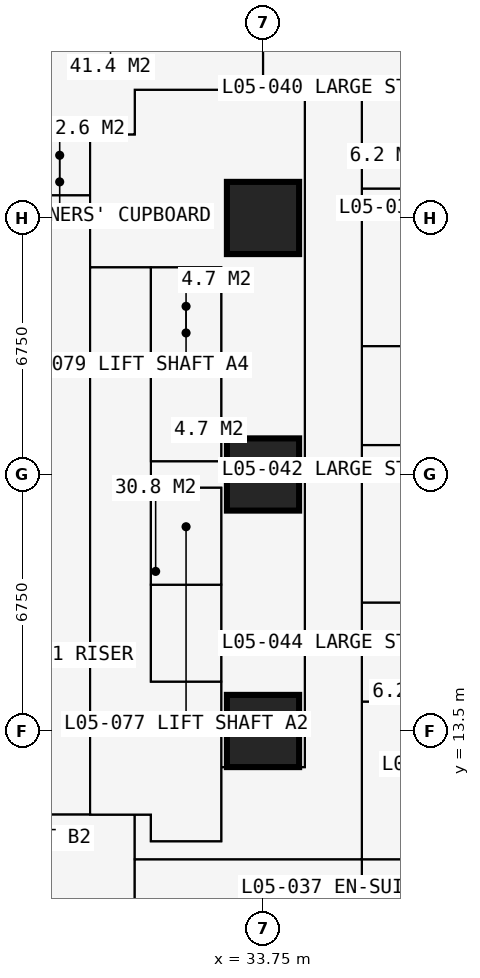
"""IFC4 building model, lengths in metres.
Left out: names, types, materials, properties, quantities, classifications, styles, units other than length and angle.
Written with IfcOpenShell. Run it as: python <this file> out.ifc"""

import sys

from ifc_helpers import new_model, si_unit, direction, frame, frame_2d, origin, origin_2d, place, context, subcontext, project, spatial, rectangle, extrude, element, fill, save


model = new_model("IFC4")
c1 = context("Model", 3, precision=1e-05, world=origin(), true_north=direction((0.0, 1.0)))
c2 = subcontext(c1, "Body", "Model", "MODEL_VIEW")
j1 = project(units=[si_unit("LENGTHUNIT", "METRE"), si_unit("PLANEANGLEUNIT", "RADIAN")], contexts=[c1])
p1 = place(None, origin())
s1 = spatial("IfcSite", under=j1, at=p1, CompositionType="ELEMENT")
p2 = place(p1, origin())
s2 = spatial("IfcBuilding", under=s1, at=p2, CompositionType="ELEMENT")
p3 = place(p2, frame((0.0, 0.0, 21.6)))
s3 = spatial("IfcBuildingStorey", under=s2, at=p3, CompositionType="ELEMENT", Elevation=21.6)
for number, where, z_axis, x_axis in (
    (1, (33.75, 13.5, 0.0), (0.0, 0.0, 1.0), (1.0, 0.0, 0.0)),
    (2, (33.75, 20.25, 0.0), (0.0, 0.0, 1.0), (1.0, 0.0, 0.0)),
    (3, (33.75, 27.0, 0.0), (0.0, 0.0, 1.0), (1.0, 0.0, 0.0)),
):
    element("IfcColumn", number, at=place(p3, frame(where, z_axis=z_axis, x_axis=x_axis)), inside=s3, PredefinedType="COLUMN", context=c2, shape_type="SweptSolid", body=[
        extrude(rectangle(XDim=1.9, YDim=1.9, at=origin_2d()), origin(), (0.0, 0.0, 1.0), 3.6),
    ])
p4 = place(p3, frame((10.125, 11.3, 0.0), z_axis=(0.0, 0.0, 1.0), x_axis=(1.0, 0.0, 0.0)))
e4 = element("IfcWall", 4, at=p4, inside=s3, PredefinedType="PARTITIONING", context=c2, shape_type="SweptSolid", body=[
    extrude(rectangle(XDim=20.675, YDim=0.15, at=frame_2d((10.337, 0.0))), origin(), (0.0, 0.0, 1.0), 3.375),
])
p5 = place(p4, frame((8.375, 0.0, 0.0)))
e5 = element("IfcOpeningElement", 5, at=p5, cuts=e4, PredefinedType="OPENING", context=c2, shape_type="SweptSolid", body=[
    extrude(rectangle(XDim=1.0, YDim=2.2, at=frame_2d((0.5, 1.1))), frame((0.0, 0.085, 0.0), z_axis=(0.0, -1.0, 0.0), x_axis=(1.0, 0.0, 0.0)), (0.0, 0.0, 1.0), 0.17),
])
p6 = place(p4, frame((10.975, 0.0, 0.0)))
e6 = element("IfcOpeningElement", 6, at=p6, cuts=e4, PredefinedType="OPENING", context=c2, shape_type="SweptSolid", body=[
    extrude(rectangle(XDim=1.0, YDim=2.2, at=frame_2d((0.5, 1.1))), frame((0.0, 0.085, 0.0), z_axis=(0.0, -1.0, 0.0), x_axis=(1.0, 0.0, 0.0)), (0.0, 0.0, 1.0), 0.17),
])
p7 = place(p4, frame((3.925, 0.0, 0.0)))
e7 = element("IfcOpeningElement", 7, at=p7, cuts=e4, PredefinedType="OPENING", context=c2, shape_type="SweptSolid", body=[
    extrude(rectangle(XDim=0.95, YDim=2.2, at=frame_2d((0.475, 1.1))), frame((0.0, 0.085, 0.0), z_axis=(0.0, -1.0, 0.0), x_axis=(1.0, 0.0, 0.0)), (0.0, 0.0, 1.0), 0.17),
])
p8 = place(p3, frame((11.3, 29.2, 0.0), z_axis=(0.0, 0.0, 1.0), x_axis=(1.0, 0.0, 0.0)))
e8 = element("IfcWall", 8, at=p8, inside=s3, PredefinedType="PARTITIONING", context=c2, shape_type="SweptSolid", body=[
    extrude(rectangle(XDim=19.075, YDim=0.15, at=frame_2d((9.538, 0.0))), origin(), (0.0, 0.0, 1.0), 3.375),
])
p9 = place(p8, frame((12.875, 0.0, 0.0)))
e9 = element("IfcOpeningElement", 9, at=p9, cuts=e8, PredefinedType="OPENING", context=c2, shape_type="SweptSolid", body=[
    extrude(rectangle(XDim=1.0, YDim=2.2, at=frame_2d((0.5, 1.1))), frame((0.0, 0.085, 0.0), z_axis=(0.0, -1.0, 0.0), x_axis=(1.0, 0.0, 0.0)), (0.0, 0.0, 1.0), 0.17),
])
p10 = place(p8, frame((10.438, 0.0, 0.0)))
e10 = element("IfcOpeningElement", 10, at=p10, cuts=e8, PredefinedType="OPENING", context=c2, shape_type="SweptSolid", body=[
    extrude(rectangle(XDim=1.0, YDim=2.2, at=frame_2d((0.5, 1.1))), frame((0.0, 0.085, 0.0), z_axis=(0.0, -1.0, 0.0), x_axis=(1.0, 0.0, 0.0)), (0.0, 0.0, 1.0), 0.17),
])
p11 = place(p8, frame((14.875, 0.0, 0.0)))
e11 = element("IfcOpeningElement", 11, at=p11, cuts=e8, PredefinedType="OPENING", context=c2, shape_type="SweptSolid", body=[
    extrude(rectangle(XDim=0.95, YDim=2.2, at=frame_2d((0.475, 1.1))), frame((0.0, 0.085, 0.0), z_axis=(0.0, -1.0, 0.0), x_axis=(1.0, 0.0, 0.0)), (0.0, 0.0, 1.0), 0.17),
])
p12 = place(p3, frame((27.6, 27.6, 0.0), z_axis=(0.0, 0.0, 1.0), x_axis=(1.0, 0.0, 0.0)))
e12 = element("IfcWall", 12, at=p12, inside=s3, PredefinedType="PARTITIONING", context=c2, shape_type="SweptSolid", body=[
    extrude(rectangle(XDim=1.6, YDim=0.15, at=frame_2d((0.8, 0.0))), origin(), (0.0, 0.0, 1.0), 2.877),
])
p13 = place(p3, frame((29.2, 11.3, 0.0), z_axis=(0.0, 0.0, 1.0), x_axis=(0.0, 1.0, 0.0)))
e13 = element("IfcWall", 13, at=p13, inside=s3, PredefinedType="PARTITIONING", context=c2, shape_type="SweptSolid", body=[
    extrude(rectangle(XDim=17.9, YDim=0.2, at=frame_2d((8.95, 0.0))), origin(), (0.0, 0.0, 1.0), 3.375),
])
p14 = place(p13, frame((8.35, 0.0, 0.0)))
e14 = element("IfcOpeningElement", 14, at=p14, cuts=e13, PredefinedType="OPENING", context=c2, shape_type="SweptSolid", body=[
    extrude(rectangle(XDim=1.2, YDim=2.2, at=frame_2d((0.6, 1.1))), frame((0.0, 0.11, 0.0), z_axis=(0.0, -1.0, 0.0), x_axis=(1.0, 0.0, 0.0)), (0.0, 0.0, 1.0), 0.22),
])
p15 = place(p3, frame((29.2, 25.7, 0.0), z_axis=(0.0, 0.0, 1.0), x_axis=(1.0, 0.0, 0.0)))
e15 = element("IfcWall", 15, at=p15, inside=s3, PredefinedType="SHEAR", context=c2, shape_type="SweptSolid", body=[
    extrude(rectangle(XDim=3.45, YDim=0.1, at=frame_2d((1.725, 0.0))), origin(), (0.0, 0.0, 1.0), 3.375),
])
p16 = place(p3, frame((30.375, -0.734, 0.0), z_axis=(0.0, 0.0, 1.0), x_axis=(0.0, 1.0, 0.0)))
e16 = element("IfcWall", 16, at=p16, inside=s3, PredefinedType="PARTITIONING", context=c2, shape_type="SweptSolid", body=[
    extrude(rectangle(XDim=12.034, YDim=0.15, at=frame_2d((6.017, 0.0))), origin(), (0.0, 0.0, 1.0), 3.375),
])
p17 = place(p3, frame((30.375, 10.125, 0.0), z_axis=(0.0, 0.0, 1.0), x_axis=(1.0, 0.0, 0.0)))
e17 = element("IfcWall", 17, at=p17, inside=s3, PredefinedType="PARTITIONING", context=c2, shape_type="SweptSolid", body=[
    extrude(rectangle(XDim=10.859, YDim=0.15, at=frame_2d((5.429, 0.0))), origin(), (0.0, 0.0, 1.0), 3.375),
])
p18 = place(p17, frame((2.5, 0.0, 0.0)))
e18 = element("IfcOpeningElement", 18, at=p18, cuts=e17, PredefinedType="OPENING", context=c2, shape_type="SweptSolid", body=[
    extrude(rectangle(XDim=1.0, YDim=2.2, at=frame_2d((0.5, 1.1))), frame((0.0, 0.085, 0.0), z_axis=(0.0, -1.0, 0.0), x_axis=(1.0, 0.0, 0.0)), (0.0, 0.0, 1.0), 0.17),
])
p19 = place(p3, frame((30.375, 29.2, 0.0), z_axis=(0.0, 0.0, 1.0), x_axis=(0.0, 1.0, 0.0)))
e19 = element("IfcWall", 19, at=p19, inside=s3, PredefinedType="PARTITIONING", context=c2, shape_type="SweptSolid", body=[
    extrude(rectangle(XDim=1.175, YDim=0.15, at=frame_2d((0.587, 0.0))), origin(), (0.0, 0.0, 1.0), 3.375),
])
p20 = place(p3, frame((30.375, 30.375, 0.0), z_axis=(0.0, 0.0, 1.0), x_axis=(1.0, 0.0, 0.0)))
e20 = element("IfcWall", 20, at=p20, inside=s3, PredefinedType="PARTITIONING", context=c2, shape_type="SweptSolid", body=[
    extrude(rectangle(XDim=10.859, YDim=0.15, at=frame_2d((5.429, 0.0))), origin(), (0.0, 0.0, 1.0), 3.375),
])
p21 = place(p3, frame((30.8, 10.6, 0.0), z_axis=(0.0, 0.0, 1.0), x_axis=(0.0, 1.0, 0.0)))
e21 = element("IfcWall", 21, at=p21, inside=s3, PredefinedType="PARTITIONING", context=c2, shape_type="SweptSolid", body=[
    extrude(rectangle(XDim=0.7, YDim=0.15, at=frame_2d((0.35, 0.0))), origin(), (0.0, 0.0, 1.0), 3.375),
])
p22 = place(p3, frame((30.8, 10.6, 0.0), z_axis=(0.0, 0.0, 1.0), x_axis=(1.0, 0.0, 0.0)))
e22 = element("IfcWall", 22, at=p22, inside=s3, PredefinedType="PARTITIONING", context=c2, shape_type="SweptSolid", body=[
    extrude(rectangle(XDim=1.85, YDim=0.15, at=frame_2d((0.925, 0.0))), origin(), (0.0, 0.0, 1.0), 3.375),
])
p23 = place(p3, frame((30.8, 14.8, 0.0), z_axis=(0.0, 0.0, 1.0), x_axis=(0.0, 1.0, 0.0)))
e23 = element("IfcWall", 23, at=p23, inside=s3, PredefinedType="PARTITIONING", context=c2, shape_type="SweptSolid", body=[
    extrude(rectangle(XDim=10.9, YDim=0.15, at=frame_2d((5.45, 0.0))), origin(), (0.0, 0.0, 1.0), 3.375),
])
p24 = place(p23, frame((0.75, 0.0, 0.0)))
e24 = element("IfcOpeningElement", 24, at=p24, cuts=e23, PredefinedType="OPENING", context=c2, shape_type="SweptSolid", body=[
    extrude(rectangle(XDim=1.1, YDim=2.2, at=frame_2d((0.55, 1.1))), frame((0.0, 0.085, 0.0), z_axis=(0.0, -1.0, 0.0), x_axis=(1.0, 0.0, 0.0)), (0.0, 0.0, 1.0), 0.17),
])
p25 = place(p23, frame((3.25, 0.0, 0.0)))
e25 = element("IfcOpeningElement", 25, at=p25, cuts=e23, PredefinedType="OPENING", context=c2, shape_type="SweptSolid", body=[
    extrude(rectangle(XDim=1.1, YDim=2.2, at=frame_2d((0.55, 1.1))), frame((0.0, 0.085, 0.0), z_axis=(0.0, -1.0, 0.0), x_axis=(1.0, 0.0, 0.0)), (0.0, 0.0, 1.0), 0.17),
])
p26 = place(p23, frame((6.5, 0.0, 0.0)))
e26 = element("IfcOpeningElement", 26, at=p26, cuts=e23, PredefinedType="OPENING", context=c2, shape_type="SweptSolid", body=[
    extrude(rectangle(XDim=1.1, YDim=2.2, at=frame_2d((0.55, 1.1))), frame((0.0, 0.085, 0.0), z_axis=(0.0, -1.0, 0.0), x_axis=(1.0, 0.0, 0.0)), (0.0, 0.0, 1.0), 0.17),
])
p27 = place(p23, frame((9.05, 0.0, 0.0)))
e27 = element("IfcOpeningElement", 27, at=p27, cuts=e23, PredefinedType="OPENING", context=c2, shape_type="SweptSolid", body=[
    extrude(rectangle(XDim=1.1, YDim=2.2, at=frame_2d((0.55, 1.1))), frame((0.0, 0.085, 0.0), z_axis=(0.0, -1.0, 0.0), x_axis=(1.0, 0.0, 0.0)), (0.0, 0.0, 1.0), 0.17),
])
for number, where, z_axis, x_axis in (
    (28, (30.8, 14.8, 0.0), (0.0, 0.0, 1.0), (1.0, 0.0, 0.0)),
    (29, (30.8, 17.35, 0.0), (0.0, 0.0, 1.0), (1.0, 0.0, 0.0)),
    (30, (30.8, 19.9, 0.0), (0.0, 0.0, 1.0), (1.0, 0.0, 0.0)),
    (31, (30.8, 20.6, 0.0), (0.0, 0.0, 1.0), (1.0, 0.0, 0.0)),
    (32, (30.8, 23.15, 0.0), (0.0, 0.0, 1.0), (1.0, 0.0, 0.0)),
):
    element("IfcWall", number, at=place(p3, frame(where, z_axis=z_axis, x_axis=x_axis)), inside=s3, PredefinedType="SHEAR", context=c2, shape_type="SweptSolid", body=[
        extrude(rectangle(XDim=1.85, YDim=0.1, at=frame_2d((0.925, 0.0))), origin(), (0.0, 0.0, 1.0), 3.375),
    ])
p28 = place(p3, frame((32.65, 10.6, 0.0), z_axis=(0.0, 0.0, 1.0), x_axis=(0.0, 1.0, 0.0)))
e33 = element("IfcWall", 33, at=p28, inside=s3, PredefinedType="SHEAR", context=c2, shape_type="SweptSolid", body=[
    extrude(rectangle(XDim=9.3, YDim=0.1, at=frame_2d((4.65, 0.0))), origin(), (0.0, 0.0, 1.0), 3.375),
])
p29 = place(p28, frame((0.5, 0.0, 0.0)))
e34 = element("IfcOpeningElement", 34, at=p29, cuts=e33, PredefinedType="OPENING", context=c2, shape_type="SweptSolid", body=[
    extrude(rectangle(XDim=1.0, YDim=2.2, at=frame_2d((0.5, 1.1))), frame((0.0, 0.06, 0.0), z_axis=(0.0, -1.0, 0.0), x_axis=(1.0, 0.0, 0.0)), (0.0, 0.0, 1.0), 0.12),
])
p30 = place(p3, frame((32.65, 12.55, 0.0), z_axis=(0.0, 0.0, 1.0), x_axis=(1.0, 0.0, 0.0)))
e35 = element("IfcWall", 35, at=p30, inside=s3, PredefinedType="PARTITIONING", context=c2, shape_type="SweptSolid", body=[
    extrude(rectangle(XDim=2.2, YDim=0.15, at=frame_2d((1.1, 0.0))), origin(), (0.0, 0.0, 1.0), 3.375),
])
p31 = place(p3, frame((32.65, 20.6, 0.0), z_axis=(0.0, 0.0, 1.0), x_axis=(0.0, 1.0, 0.0)))
e36 = element("IfcWall", 36, at=p31, inside=s3, PredefinedType="PARTITIONING", context=c2, shape_type="SweptSolid", body=[
    extrude(rectangle(XDim=5.1, YDim=0.15, at=frame_2d((2.55, 0.0))), origin(), (0.0, 0.0, 1.0), 3.375),
])
p32 = place(p3, frame((33.75, 30.375, 0.0), z_axis=(0.0, 0.0, 1.0), x_axis=(0.0, 1.0, 0.0)))
e37 = element("IfcWall", 37, at=p32, inside=s3, PredefinedType="PARTITIONING", context=c2, shape_type="SweptSolid", body=[
    extrude(rectangle(XDim=5.975, YDim=0.15, at=frame_2d((2.988, 0.0))), origin(), (0.0, 0.0, 1.0), 2.877),
])
p33 = place(p3, frame((34.85, 12.55, 0.0), z_axis=(0.0, 0.0, 1.0), x_axis=(0.0, 1.0, 0.0)))
e38 = element("IfcWall", 38, at=p33, inside=s3, PredefinedType="PARTITIONING", context=c2, shape_type="SweptSolid", body=[
    extrude(rectangle(XDim=17.825, YDim=0.15, at=frame_2d((8.913, 0.0))), origin(), (0.0, 0.0, 1.0), 3.375),
])
p34 = place(p33, frame((8.65, 0.0, 0.0)))
e39 = element("IfcOpeningElement", 39, at=p34, cuts=e38, PredefinedType="OPENING", context=c2, shape_type="SweptSolid", body=[
    extrude(rectangle(XDim=0.95, YDim=2.2, at=frame_2d((0.475, 1.1))), frame((0.0, 0.085, 0.0), z_axis=(0.0, -1.0, 0.0), x_axis=(1.0, 0.0, 0.0)), (0.0, 0.0, 1.0), 0.17),
])
p35 = place(p3, frame((36.35, 6.75, 0.0), z_axis=(0.0, 0.0, 1.0), x_axis=(0.0, 1.0, 0.0)))
e40 = element("IfcWall", 40, at=p35, inside=s3, PredefinedType="PARTITIONING", context=c2, shape_type="SweptSolid", body=[
    extrude(rectangle(XDim=23.625, YDim=0.15, at=frame_2d((11.812, 0.0))), origin(), (0.0, 0.0, 1.0), 3.375),
])
p36 = place(p35, frame((0.2, 0.0, 0.0)))
e41 = element("IfcOpeningElement", 41, at=p36, cuts=e40, PredefinedType="OPENING", context=c2, shape_type="SweptSolid", body=[
    extrude(rectangle(XDim=0.95, YDim=2.2, at=frame_2d((0.475, 1.1))), frame((0.0, 0.085, 0.0), z_axis=(0.0, -1.0, 0.0), x_axis=(1.0, 0.0, 0.0)), (0.0, 0.0, 1.0), 0.17),
])
p37 = place(p35, frame((18.475, 0.0, 0.0)))
e42 = element("IfcOpeningElement", 42, at=p37, cuts=e40, PredefinedType="OPENING", context=c2, shape_type="SweptSolid", body=[
    extrude(rectangle(XDim=0.95, YDim=2.2, at=frame_2d((0.475, 1.1))), frame((0.0, 0.085, 0.0), z_axis=(0.0, -1.0, 0.0), x_axis=(1.0, 0.0, 0.0)), (0.0, 0.0, 1.0), 0.17),
])
p38 = place(p35, frame((11.725, 0.0, 0.0)))
e43 = element("IfcOpeningElement", 43, at=p38, cuts=e40, PredefinedType="OPENING", context=c2, shape_type="SweptSolid", body=[
    extrude(rectangle(XDim=0.95, YDim=2.2, at=frame_2d((0.475, 1.1))), frame((0.0, 0.085, 0.0), z_axis=(0.0, -1.0, 0.0), x_axis=(1.0, 0.0, 0.0)), (0.0, 0.0, 1.0), 0.17),
])
p39 = place(p35, frame((4.975, 0.0, 0.0)))
e44 = element("IfcOpeningElement", 44, at=p39, cuts=e40, PredefinedType="OPENING", context=c2, shape_type="SweptSolid", body=[
    extrude(rectangle(XDim=0.95, YDim=2.2, at=frame_2d((0.475, 1.1))), frame((0.0, 0.085, 0.0), z_axis=(0.0, -1.0, 0.0), x_axis=(1.0, 0.0, 0.0)), (0.0, 0.0, 1.0), 0.17),
])
p40 = place(p3, frame((36.35, 14.275, 0.0), z_axis=(0.0, 0.0, 1.0), x_axis=(1.0, 0.0, 0.0)))
e45 = element("IfcWall", 45, at=p40, inside=s3, PredefinedType="PARTITIONING", context=c2, shape_type="SweptSolid", body=[
    extrude(rectangle(XDim=2.4, YDim=0.1, at=frame_2d((1.2, 0.0))), origin(), (0.0, 0.0, 1.0), 3.375),
])
p41 = place(p3, frame((36.35, 16.875, 0.0), z_axis=(0.0, 0.0, 1.0), x_axis=(1.0, 0.0, 0.0)))
e46 = element("IfcWall", 46, at=p41, inside=s3, PredefinedType="PARTITIONING", context=c2, shape_type="SweptSolid", body=[
    extrude(rectangle(XDim=4.884, YDim=0.175, at=frame_2d((2.442, 0.0))), origin(), (0.0, 0.0, 1.0), 3.375),
])
p42 = place(p41, frame((0.75, 0.0, 0.0)))
e47 = element("IfcOpeningElement", 47, at=p42, cuts=e46, PredefinedType="OPENING", context=c2, shape_type="SweptSolid", body=[
    extrude(rectangle(XDim=0.9, YDim=2.2, at=frame_2d((0.45, 1.1))), frame((0.0, 0.097, 0.0), z_axis=(0.0, -1.0, 0.0), x_axis=(1.0, 0.0, 0.0)), (0.0, 0.0, 1.0), 0.195),
])
p43 = place(p3, frame((36.35, 21.025, 0.0), z_axis=(0.0, 0.0, 1.0), x_axis=(1.0, 0.0, 0.0)))
e48 = element("IfcWall", 48, at=p43, inside=s3, PredefinedType="PARTITIONING", context=c2, shape_type="SweptSolid", body=[
    extrude(rectangle(XDim=2.4, YDim=0.1, at=frame_2d((1.2, 0.0))), origin(), (0.0, 0.0, 1.0), 3.375),
])
p44 = place(p3, frame((36.35, 23.625, 0.0), z_axis=(0.0, 0.0, 1.0), x_axis=(1.0, 0.0, 0.0)))
e49 = element("IfcWall", 49, at=p44, inside=s3, PredefinedType="PARTITIONING", context=c2, shape_type="SweptSolid", body=[
    extrude(rectangle(XDim=4.884, YDim=0.175, at=frame_2d((2.442, 0.0))), origin(), (0.0, 0.0, 1.0), 3.375),
])
p45 = place(p44, frame((0.75, 0.0, 0.0)))
e50 = element("IfcOpeningElement", 50, at=p45, cuts=e49, PredefinedType="OPENING", context=c2, shape_type="SweptSolid", body=[
    extrude(rectangle(XDim=0.9, YDim=2.2, at=frame_2d((0.45, 1.1))), frame((0.0, 0.097, 0.0), z_axis=(0.0, -1.0, 0.0), x_axis=(1.0, 0.0, 0.0)), (0.0, 0.0, 1.0), 0.195),
])
p46 = place(p3, frame((36.35, 27.775, 0.0), z_axis=(0.0, 0.0, 1.0), x_axis=(1.0, 0.0, 0.0)))
e51 = element("IfcWall", 51, at=p46, inside=s3, PredefinedType="PARTITIONING", context=c2, shape_type="SweptSolid", body=[
    extrude(rectangle(XDim=2.4, YDim=0.1, at=frame_2d((1.2, 0.0))), origin(), (0.0, 0.0, 1.0), 3.375),
])
p47 = place(p18, origin())
e52 = element("IfcDoor", 52, at=p47, inside=s3, OperationType="SINGLE_SWING_LEFT", PredefinedType="DOOR", context=c2, shape_type="SweptSolid", body=[
    extrude(rectangle(XDim=1.0, YDim=2.2, at=frame_2d((0.5, 1.1))), frame((0.0, 0.025, 0.0), z_axis=(0.0, -1.0, 0.0), x_axis=(1.0, 0.0, 0.0)), (0.0, 0.0, 1.0), 0.05),
])
fill(e18, e52)
p48 = place(p37, origin())
e53 = element("IfcDoor", 53, at=p48, inside=s3, OperationType="SINGLE_SWING_LEFT", PredefinedType="DOOR", context=c2, shape_type="SweptSolid", body=[
    extrude(rectangle(XDim=0.95, YDim=2.2, at=frame_2d((0.475, 1.1))), frame((0.0, 0.025, 0.0), z_axis=(0.0, -1.0, 0.0), x_axis=(1.0, 0.0, 0.0)), (0.0, 0.0, 1.0), 0.05),
])
fill(e42, e53)
p49 = place(p38, origin())
e54 = element("IfcDoor", 54, at=p49, inside=s3, OperationType="SINGLE_SWING_LEFT", PredefinedType="DOOR", context=c2, shape_type="SweptSolid", body=[
    extrude(rectangle(XDim=0.95, YDim=2.2, at=frame_2d((0.475, 1.1))), frame((0.0, 0.025, 0.0), z_axis=(0.0, -1.0, 0.0), x_axis=(1.0, 0.0, 0.0)), (0.0, 0.0, 1.0), 0.05),
])
fill(e43, e54)
p50 = place(p45, origin())
e55 = element("IfcDoor", 55, at=p50, inside=s3, OperationType="SINGLE_SWING_RIGHT", PredefinedType="DOOR", context=c2, shape_type="SweptSolid", body=[
    extrude(rectangle(XDim=0.9, YDim=2.2, at=frame_2d((0.45, 1.1))), frame((0.0, 0.025, 0.0), z_axis=(0.0, -1.0, 0.0), x_axis=(1.0, 0.0, 0.0)), (0.0, 0.0, 1.0), 0.05),
])
fill(e50, e55)
p51 = place(p39, origin())
e56 = element("IfcDoor", 56, at=p51, inside=s3, OperationType="SINGLE_SWING_LEFT", PredefinedType="DOOR", context=c2, shape_type="SweptSolid", body=[
    extrude(rectangle(XDim=0.95, YDim=2.2, at=frame_2d((0.475, 1.1))), frame((0.0, 0.025, 0.0), z_axis=(0.0, -1.0, 0.0), x_axis=(1.0, 0.0, 0.0)), (0.0, 0.0, 1.0), 0.05),
])
fill(e44, e56)
p52 = place(p42, origin())
e57 = element("IfcDoor", 57, at=p52, inside=s3, OperationType="SINGLE_SWING_RIGHT", PredefinedType="DOOR", context=c2, shape_type="SweptSolid", body=[
    extrude(rectangle(XDim=0.9, YDim=2.2, at=frame_2d((0.45, 1.1))), frame((0.0, 0.025, 0.0), z_axis=(0.0, -1.0, 0.0), x_axis=(1.0, 0.0, 0.0)), (0.0, 0.0, 1.0), 0.05),
])
fill(e47, e57)
p53 = place(p29, origin())
e58 = element("IfcDoor", 58, at=p53, inside=s3, OperationType="SINGLE_SWING_LEFT", PredefinedType="DOOR", context=c2, shape_type="SweptSolid", body=[
    extrude(rectangle(XDim=1.0, YDim=2.2, at=frame_2d((0.5, 1.1))), frame((0.0, 0.025, 0.0), z_axis=(0.0, -1.0, 0.0), x_axis=(1.0, 0.0, 0.0)), (0.0, 0.0, 1.0), 0.05),
])
fill(e34, e58)
p54 = place(p34, origin())
e59 = element("IfcDoor", 59, at=p54, inside=s3, OperationType="SINGLE_SWING_LEFT", PredefinedType="DOOR", context=c2, shape_type="SweptSolid", body=[
    extrude(rectangle(XDim=0.95, YDim=2.2, at=frame_2d((0.475, 1.1))), frame((0.0, 0.025, 0.0), z_axis=(0.0, -1.0, 0.0), x_axis=(1.0, 0.0, 0.0)), (0.0, 0.0, 1.0), 0.05),
])
fill(e39, e59)
p55 = place(p24, origin())
e60 = element("IfcDoor", 60, at=p55, inside=s3, OperationType="DOUBLE_DOOR_SLIDING", PredefinedType="DOOR", context=c2, shape_type="SweptSolid", body=[
    extrude(rectangle(XDim=1.1, YDim=2.2, at=frame_2d((0.55, 1.1))), frame((0.0, 0.025, 0.0), z_axis=(0.0, -1.0, 0.0), x_axis=(1.0, 0.0, 0.0)), (0.0, 0.0, 1.0), 0.05),
])
fill(e24, e60)
p56 = place(p25, origin())
e61 = element("IfcDoor", 61, at=p56, inside=s3, OperationType="DOUBLE_DOOR_SLIDING", PredefinedType="DOOR", context=c2, shape_type="SweptSolid", body=[
    extrude(rectangle(XDim=1.1, YDim=2.2, at=frame_2d((0.55, 1.1))), frame((0.0, 0.025, 0.0), z_axis=(0.0, -1.0, 0.0), x_axis=(1.0, 0.0, 0.0)), (0.0, 0.0, 1.0), 0.05),
])
fill(e25, e61)
p57 = place(p26, origin())
e62 = element("IfcDoor", 62, at=p57, inside=s3, OperationType="DOUBLE_DOOR_SLIDING", PredefinedType="DOOR", context=c2, shape_type="SweptSolid", body=[
    extrude(rectangle(XDim=1.1, YDim=2.2, at=frame_2d((0.55, 1.1))), frame((0.0, 0.025, 0.0), z_axis=(0.0, -1.0, 0.0), x_axis=(1.0, 0.0, 0.0)), (0.0, 0.0, 1.0), 0.05),
])
fill(e26, e62)
p58 = place(p27, origin())
e63 = element("IfcDoor", 63, at=p58, inside=s3, OperationType="DOUBLE_DOOR_SLIDING", PredefinedType="DOOR", context=c2, shape_type="SweptSolid", body=[
    extrude(rectangle(XDim=1.1, YDim=2.2, at=frame_2d((0.55, 1.1))), frame((0.0, 0.025, 0.0), z_axis=(0.0, -1.0, 0.0), x_axis=(1.0, 0.0, 0.0)), (0.0, 0.0, 1.0), 0.05),
])
fill(e27, e63)
p59 = place(p14, origin())
e64 = element("IfcDoor", 64, at=p59, inside=s3, OperationType="DOUBLE_DOOR_SINGLE_SWING", PredefinedType="DOOR", context=c2, shape_type="SweptSolid", body=[
    extrude(rectangle(XDim=1.2, YDim=2.2, at=frame_2d((0.6, 1.1))), frame((0.0, 0.025, 0.0), z_axis=(0.0, -1.0, 0.0), x_axis=(1.0, 0.0, 0.0)), (0.0, 0.0, 1.0), 0.05),
])
fill(e14, e64)
save(model, sys.argv[1])
